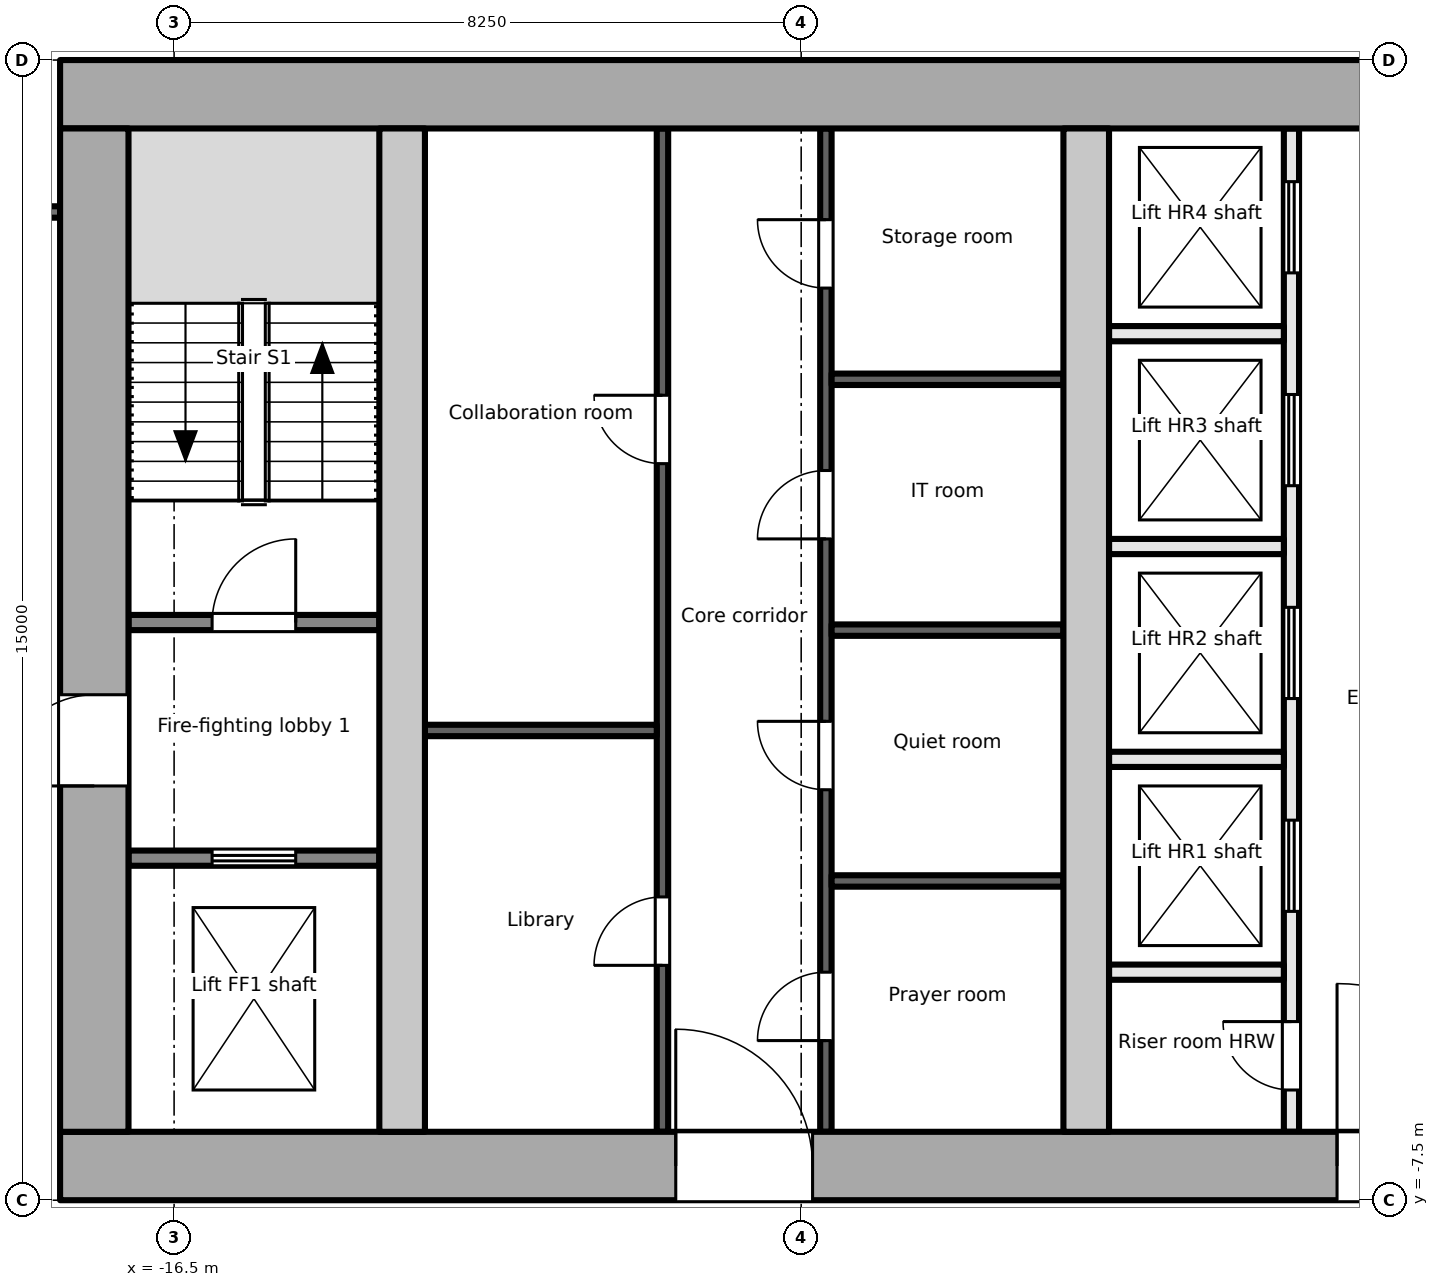
"""IFC4 building model, lengths in metres.
Left out: names, types, materials, properties, quantities, classifications, styles, units other than length and angle.
Written with IfcOpenShell. Run it as: python <this file> out.ifc"""

import sys

from ifc_helpers import new_model, si_unit, direction, frame, frame_2d, origin, place, context, subcontext, project, spatial, rectangle, extrude, element, fill, save


model = new_model("IFC4")
c1 = context("Model", 3, precision=1e-05, world=origin(), true_north=direction((0.0, 1.0)))
c2 = subcontext(c1, "Body", "Model", "MODEL_VIEW")
j1 = project(units=[si_unit("LENGTHUNIT", "METRE"), si_unit("PLANEANGLEUNIT", "RADIAN")], contexts=[c1])
p1 = place(None, origin())
s1 = spatial("IfcSite", under=j1, at=p1, CompositionType="ELEMENT")
p2 = place(p1, origin())
s2 = spatial("IfcBuilding", under=s1, at=p2, CompositionType="ELEMENT")
p3 = place(p2, frame((0.0, 0.0, 191.9)))
s3 = spatial("IfcBuildingStorey", under=s2, at=p3, CompositionType="ELEMENT", Elevation=191.9)
p4 = place(p3, frame((-18.0, -7.05, -0.2), z_axis=(0.0, 0.0, 1.0), x_axis=(1.0, 0.0, 0.0)))
e1 = element("IfcWall", 1, at=p4, inside=s3, PredefinedType="SHEAR", context=c2, shape_type="SweptSolid", body=[
    extrude(rectangle(XDim=36.0, YDim=0.9, at=frame_2d((18.0, 0.0))), origin(), (0.0, 0.0, 1.0), 3.9),
])
p5 = place(p4, frame((8.1, 0.0, 0.2)))
e2 = element("IfcOpeningElement", 2, at=p5, cuts=e1, PredefinedType="OPENING", context=c2, shape_type="SweptSolid", body=[
    extrude(rectangle(XDim=1.8, YDim=2.1, at=frame_2d((0.9, 1.05))), frame((0.0, 0.46, 0.0), z_axis=(0.0, -1.0, 0.0), x_axis=(1.0, 0.0, 0.0)), (0.0, 0.0, 1.0), 0.921),
])
p6 = place(p4, frame((16.8, 0.0, 0.2)))
e3 = element("IfcOpeningElement", 3, at=p6, cuts=e1, PredefinedType="OPENING", context=c2, shape_type="SweptSolid", body=[
    extrude(rectangle(XDim=2.4, YDim=2.1, at=frame_2d((1.2, 1.05))), frame((0.0, 0.46, 0.0), z_axis=(0.0, -1.0, 0.0), x_axis=(1.0, 0.0, 0.0)), (0.0, 0.0, 1.0), 0.921),
])
p7 = place(p4, frame((26.1, 0.0, 0.2)))
e4 = element("IfcOpeningElement", 4, at=p7, cuts=e1, PredefinedType="OPENING", context=c2, shape_type="SweptSolid", body=[
    extrude(rectangle(XDim=2.4, YDim=2.1, at=frame_2d((1.2, 1.05))), frame((0.0, 0.46, 0.0), z_axis=(0.0, -1.0, 0.0), x_axis=(1.0, 0.0, 0.0)), (0.0, 0.0, 1.0), 0.921),
])
p8 = place(p3, frame((-18.0, 7.05, -0.2), z_axis=(0.0, 0.0, 1.0), x_axis=(1.0, 0.0, 0.0)))
e5 = element("IfcWall", 5, at=p8, inside=s3, PredefinedType="SHEAR", context=c2, shape_type="SweptSolid", body=[
    extrude(rectangle(XDim=36.0, YDim=0.9, at=frame_2d((18.0, 0.0))), origin(), (0.0, 0.0, 1.0), 3.9),
])
p9 = place(p3, frame((-17.55, -6.6, -0.2), z_axis=(0.0, 0.0, 1.0), x_axis=(0.0, 1.0, 0.0)))
e6 = element("IfcWall", 6, at=p9, inside=s3, PredefinedType="SHEAR", context=c2, shape_type="SweptSolid", body=[
    extrude(rectangle(XDim=13.2, YDim=0.9, at=frame_2d((6.6, 0.0))), origin(), (0.0, 0.0, 1.0), 3.9),
])
p10 = place(p9, frame((4.55, 0.0, 0.2)))
e7 = element("IfcOpeningElement", 7, at=p10, cuts=e6, PredefinedType="OPENING", context=c2, shape_type="SweptSolid", body=[
    extrude(rectangle(XDim=1.2, YDim=2.1, at=frame_2d((0.6, 1.05))), frame((0.0, 0.46, 0.0), z_axis=(0.0, -1.0, 0.0), x_axis=(1.0, 0.0, 0.0)), (0.0, 0.0, 1.0), 0.921),
])
for number, where, z_axis, x_axis in (
    (8, (-13.5, -6.6, -0.2), (0.0, 0.0, 1.0), (0.0, 1.0, 0.0)),
    (9, (-4.5, -6.6, -0.2), (0.0, 0.0, 1.0), (0.0, 1.0, 0.0)),
):
    element("IfcWall", number, at=place(p3, frame(where, z_axis=z_axis, x_axis=x_axis)), inside=s3, PredefinedType="SHEAR", context=c2, shape_type="SweptSolid", body=[
        extrude(rectangle(XDim=13.2, YDim=0.6, at=frame_2d((6.6, 0.0))), origin(), (0.0, 0.0, 1.0), 3.9),
    ])
p11 = place(p3, frame((-17.1, -3.0, 0.0), z_axis=(0.0, 0.0, 1.0), x_axis=(1.0, 0.0, 0.0)))
e10 = element("IfcWall", 10, at=p11, inside=s3, PredefinedType="PARTITIONING", context=c2, shape_type="SweptSolid", body=[
    extrude(rectangle(XDim=3.3, YDim=0.2, at=frame_2d((1.65, 0.0))), origin(), (0.0, 0.0, 1.0), 3.7),
])
p12 = place(p11, frame((1.1, 0.0, 0.0)))
e11 = element("IfcOpeningElement", 11, at=p12, cuts=e10, PredefinedType="OPENING", context=c2, shape_type="SweptSolid", body=[
    extrude(rectangle(XDim=1.1, YDim=2.1, at=frame_2d((0.55, 1.05))), frame((0.0, 0.111, 0.0), z_axis=(0.0, -1.0, 0.0), x_axis=(1.0, 0.0, 0.0)), (0.0, 0.0, 1.0), 0.221),
])
p13 = place(p3, frame((-17.1, 0.1, 0.0), z_axis=(0.0, 0.0, 1.0), x_axis=(1.0, 0.0, 0.0)))
e12 = element("IfcWall", 12, at=p13, inside=s3, PredefinedType="PARTITIONING", context=c2, shape_type="SweptSolid", body=[
    extrude(rectangle(XDim=3.3, YDim=0.2, at=frame_2d((1.65, 0.0))), origin(), (0.0, 0.0, 1.0), 3.7),
])
p14 = place(p13, frame((1.1, 0.0, 0.0)))
e13 = element("IfcOpeningElement", 13, at=p14, cuts=e12, PredefinedType="OPENING", context=c2, shape_type="SweptSolid", body=[
    extrude(rectangle(XDim=1.1, YDim=2.1, at=frame_2d((0.55, 1.05))), frame((0.0, 0.111, 0.0), z_axis=(0.0, -1.0, 0.0), x_axis=(1.0, 0.0, 0.0)), (0.0, 0.0, 1.0), 0.221),
])
p15 = place(p3, frame((-10.075, -6.6, 0.0), z_axis=(0.0, 0.0, 1.0), x_axis=(0.0, 1.0, 0.0)))
e14 = element("IfcWall", 14, at=p15, inside=s3, PredefinedType="PARTITIONING", context=c2, shape_type="SweptSolid", body=[
    extrude(rectangle(XDim=13.2, YDim=0.15, at=frame_2d((6.6, 0.0))), origin(), (0.0, 0.0, 1.0), 3.7),
])
p16 = place(p15, frame((2.19, 0.0, 0.0)))
e15 = element("IfcOpeningElement", 15, at=p16, cuts=e14, PredefinedType="OPENING", context=c2, shape_type="SweptSolid", body=[
    extrude(rectangle(XDim=0.9, YDim=2.1, at=frame_2d((0.45, 1.05))), frame((0.0, 0.085, 0.0), z_axis=(0.0, -1.0, 0.0), x_axis=(1.0, 0.0, 0.0)), (0.0, 0.0, 1.0), 0.171),
])
p17 = place(p15, frame((8.79, 0.0, 0.0)))
e16 = element("IfcOpeningElement", 16, at=p17, cuts=e14, PredefinedType="OPENING", context=c2, shape_type="SweptSolid", body=[
    extrude(rectangle(XDim=0.9, YDim=2.1, at=frame_2d((0.45, 1.05))), frame((0.0, 0.085, 0.0), z_axis=(0.0, -1.0, 0.0), x_axis=(1.0, 0.0, 0.0)), (0.0, 0.0, 1.0), 0.171),
])
p18 = place(p3, frame((-13.2, -1.32, 0.0), z_axis=(0.0, 0.0, 1.0), x_axis=(1.0, 0.0, 0.0)))
e17 = element("IfcWall", 17, at=p18, inside=s3, PredefinedType="PARTITIONING", context=c2, shape_type="SweptSolid", body=[
    extrude(rectangle(XDim=3.05, YDim=0.15, at=frame_2d((1.525, 0.0))), origin(), (0.0, 0.0, 1.0), 3.7),
])
p19 = place(p3, frame((-7.925, -6.6, 0.0), z_axis=(0.0, 0.0, 1.0), x_axis=(0.0, 1.0, 0.0)))
e18 = element("IfcWall", 18, at=p19, inside=s3, PredefinedType="PARTITIONING", context=c2, shape_type="SweptSolid", body=[
    extrude(rectangle(XDim=13.2, YDim=0.15, at=frame_2d((6.6, 0.0))), origin(), (0.0, 0.0, 1.0), 3.7),
])
p20 = place(p19, frame((1.2, 0.0, 0.0)))
e19 = element("IfcOpeningElement", 19, at=p20, cuts=e18, PredefinedType="OPENING", context=c2, shape_type="SweptSolid", body=[
    extrude(rectangle(XDim=0.9, YDim=2.1, at=frame_2d((0.45, 1.05))), frame((0.0, 0.085, 0.0), z_axis=(0.0, -1.0, 0.0), x_axis=(1.0, 0.0, 0.0)), (0.0, 0.0, 1.0), 0.171),
])
p21 = place(p19, frame((4.5, 0.0, 0.0)))
e20 = element("IfcOpeningElement", 20, at=p21, cuts=e18, PredefinedType="OPENING", context=c2, shape_type="SweptSolid", body=[
    extrude(rectangle(XDim=0.9, YDim=2.1, at=frame_2d((0.45, 1.05))), frame((0.0, 0.085, 0.0), z_axis=(0.0, -1.0, 0.0), x_axis=(1.0, 0.0, 0.0)), (0.0, 0.0, 1.0), 0.171),
])
p22 = place(p19, frame((7.8, 0.0, 0.0)))
e21 = element("IfcOpeningElement", 21, at=p22, cuts=e18, PredefinedType="OPENING", context=c2, shape_type="SweptSolid", body=[
    extrude(rectangle(XDim=0.9, YDim=2.1, at=frame_2d((0.45, 1.05))), frame((0.0, 0.085, 0.0), z_axis=(0.0, -1.0, 0.0), x_axis=(1.0, 0.0, 0.0)), (0.0, 0.0, 1.0), 0.171),
])
p23 = place(p19, frame((11.1, 0.0, 0.0)))
e22 = element("IfcOpeningElement", 22, at=p23, cuts=e18, PredefinedType="OPENING", context=c2, shape_type="SweptSolid", body=[
    extrude(rectangle(XDim=0.9, YDim=2.1, at=frame_2d((0.45, 1.05))), frame((0.0, 0.085, 0.0), z_axis=(0.0, -1.0, 0.0), x_axis=(1.0, 0.0, 0.0)), (0.0, 0.0, 1.0), 0.171),
])
for number, where, z_axis, x_axis in (
    (23, (-7.85, -3.3, 0.0), (0.0, 0.0, 1.0), (1.0, 0.0, 0.0)),
    (24, (-7.85, 0.0, 0.0), (0.0, 0.0, 1.0), (1.0, 0.0, 0.0)),
    (25, (-7.85, 3.3, 0.0), (0.0, 0.0, 1.0), (1.0, 0.0, 0.0)),
):
    element("IfcWall", number, at=place(p3, frame(where, z_axis=z_axis, x_axis=x_axis)), inside=s3, PredefinedType="PARTITIONING", context=c2, shape_type="SweptSolid", body=[
        extrude(rectangle(XDim=3.05, YDim=0.15, at=frame_2d((1.525, 0.0))), origin(), (0.0, 0.0, 1.0), 3.7),
    ])
p24 = place(p3, frame((-1.8, -6.6, 0.0), z_axis=(0.0, 0.0, 1.0), x_axis=(0.0, 1.0, 0.0)))
e26 = element("IfcWall", 26, at=p24, inside=s3, PredefinedType="PARTITIONING", context=c2, shape_type="SweptSolid", body=[
    extrude(rectangle(XDim=13.2, YDim=0.2, at=frame_2d((6.6, 0.0))), origin(), (0.0, 0.0, 1.0), 3.7),
])
p25 = place(p24, frame((0.55, 0.0, 0.0)))
e27 = element("IfcOpeningElement", 27, at=p25, cuts=e26, PredefinedType="OPENING", context=c2, shape_type="SweptSolid", body=[
    extrude(rectangle(XDim=0.9, YDim=2.1, at=frame_2d((0.45, 1.05))), frame((0.0, 0.111, 0.0), z_axis=(0.0, -1.0, 0.0), x_axis=(1.0, 0.0, 0.0)), (0.0, 0.0, 1.0), 0.221),
])
p26 = place(p24, frame((2.9, 0.0, 0.0)))
e28 = element("IfcOpeningElement", 28, at=p26, cuts=e26, PredefinedType="OPENING", context=c2, shape_type="SweptSolid", body=[
    extrude(rectangle(XDim=1.2, YDim=2.1, at=frame_2d((0.6, 1.05))), frame((0.0, 0.111, 0.0), z_axis=(0.0, -1.0, 0.0), x_axis=(1.0, 0.0, 0.0)), (0.0, 0.0, 1.0), 0.221),
])
p27 = place(p24, frame((5.7, 0.0, 0.0)))
e29 = element("IfcOpeningElement", 29, at=p27, cuts=e26, PredefinedType="OPENING", context=c2, shape_type="SweptSolid", body=[
    extrude(rectangle(XDim=1.2, YDim=2.1, at=frame_2d((0.6, 1.05))), frame((0.0, 0.111, 0.0), z_axis=(0.0, -1.0, 0.0), x_axis=(1.0, 0.0, 0.0)), (0.0, 0.0, 1.0), 0.221),
])
p28 = place(p24, frame((8.5, 0.0, 0.0)))
e30 = element("IfcOpeningElement", 30, at=p28, cuts=e26, PredefinedType="OPENING", context=c2, shape_type="SweptSolid", body=[
    extrude(rectangle(XDim=1.2, YDim=2.1, at=frame_2d((0.6, 1.05))), frame((0.0, 0.111, 0.0), z_axis=(0.0, -1.0, 0.0), x_axis=(1.0, 0.0, 0.0)), (0.0, 0.0, 1.0), 0.221),
])
p29 = place(p24, frame((11.3, 0.0, 0.0)))
e31 = element("IfcOpeningElement", 31, at=p29, cuts=e26, PredefinedType="OPENING", context=c2, shape_type="SweptSolid", body=[
    extrude(rectangle(XDim=1.2, YDim=2.1, at=frame_2d((0.6, 1.05))), frame((0.0, 0.111, 0.0), z_axis=(0.0, -1.0, 0.0), x_axis=(1.0, 0.0, 0.0)), (0.0, 0.0, 1.0), 0.221),
])
for number, where, z_axis, x_axis in (
    (32, (-4.2, -1.7, 0.0), (0.0, 0.0, 1.0), (1.0, 0.0, 0.0)),
    (33, (-4.2, 1.1, 0.0), (0.0, 0.0, 1.0), (1.0, 0.0, 0.0)),
    (34, (-4.2, 3.9, 0.0), (0.0, 0.0, 1.0), (1.0, 0.0, 0.0)),
    (35, (-4.2, -4.5, 0.0), (0.0, 0.0, 1.0), (1.0, 0.0, 0.0)),
):
    element("IfcWall", number, at=place(p3, frame(where, z_axis=z_axis, x_axis=x_axis)), inside=s3, PredefinedType="PARTITIONING", context=c2, shape_type="SweptSolid", body=[
        extrude(rectangle(XDim=2.3, YDim=0.2, at=frame_2d((1.15, 0.0))), origin(), (0.0, 0.0, 1.0), 3.7),
    ])
p30 = place(p3, frame((-20.325, 5.501, 0.0), z_axis=(0.0, 0.0, 1.0), x_axis=(1.0, 0.0, 0.0)))
e36 = element("IfcWall", 36, at=p30, inside=s3, PredefinedType="PARTITIONING", context=c2, shape_type="SweptSolid", body=[
    extrude(rectangle(XDim=2.325, YDim=0.15, at=frame_2d((1.163, 0.0))), origin(), (0.0, 0.0, 1.0), 3.7),
])
p31 = place(p12, origin())
e37 = element("IfcDoor", 37, at=p31, inside=s3, OperationType="DOUBLE_DOOR_SLIDING", PredefinedType="DOOR", context=c2, shape_type="SweptSolid", body=[
    extrude(rectangle(XDim=1.1, YDim=2.1, at=frame_2d((0.55, 1.05))), frame((0.0, 0.025, 0.0), z_axis=(0.0, -1.0, 0.0), x_axis=(1.0, 0.0, 0.0)), (0.0, 0.0, 1.0), 0.05),
])
fill(e11, e37)
p32 = place(p10, origin())
e38 = element("IfcDoor", 38, at=p32, inside=s3, OperationType="SINGLE_SWING_LEFT", PredefinedType="DOOR", context=c2, shape_type="SweptSolid", body=[
    extrude(rectangle(XDim=1.2, YDim=2.1, at=frame_2d((0.6, 1.05))), frame((0.0, 0.025, 0.0), z_axis=(0.0, -1.0, 0.0), x_axis=(1.0, 0.0, 0.0)), (0.0, 0.0, 1.0), 0.05),
])
fill(e7, e38)
p33 = place(p14, origin())
e39 = element("IfcDoor", 39, at=p33, inside=s3, OperationType="SINGLE_SWING_RIGHT", PredefinedType="DOOR", context=c2, shape_type="SweptSolid", body=[
    extrude(rectangle(XDim=1.1, YDim=2.1, at=frame_2d((0.55, 1.05))), frame((0.0, 0.025, 0.0), z_axis=(0.0, -1.0, 0.0), x_axis=(1.0, 0.0, 0.0)), (0.0, 0.0, 1.0), 0.05),
])
fill(e13, e39)
p34 = place(p16, origin())
e40 = element("IfcDoor", 40, at=p34, inside=s3, OperationType="SINGLE_SWING_LEFT", PredefinedType="DOOR", context=c2, shape_type="SweptSolid", body=[
    extrude(rectangle(XDim=0.9, YDim=2.1, at=frame_2d((0.45, 1.05))), frame((0.0, 0.025, 0.0), z_axis=(0.0, -1.0, 0.0), x_axis=(1.0, 0.0, 0.0)), (0.0, 0.0, 1.0), 0.05),
])
fill(e15, e40)
p35 = place(p17, origin())
e41 = element("IfcDoor", 41, at=p35, inside=s3, OperationType="SINGLE_SWING_RIGHT", PredefinedType="DOOR", context=c2, shape_type="SweptSolid", body=[
    extrude(rectangle(XDim=0.9, YDim=2.1, at=frame_2d((0.45, 1.05))), frame((0.0, 0.025, 0.0), z_axis=(0.0, -1.0, 0.0), x_axis=(1.0, 0.0, 0.0)), (0.0, 0.0, 1.0), 0.05),
])
fill(e16, e41)
p36 = place(p20, origin())
e42 = element("IfcDoor", 42, at=p36, inside=s3, OperationType="SINGLE_SWING_LEFT", PredefinedType="DOOR", context=c2, shape_type="SweptSolid", body=[
    extrude(rectangle(XDim=0.9, YDim=2.1, at=frame_2d((0.45, 1.05))), frame((0.0, 0.025, 0.0), z_axis=(0.0, -1.0, 0.0), x_axis=(1.0, 0.0, 0.0)), (0.0, 0.0, 1.0), 0.05),
])
fill(e19, e42)
p37 = place(p21, origin())
e43 = element("IfcDoor", 43, at=p37, inside=s3, OperationType="SINGLE_SWING_RIGHT", PredefinedType="DOOR", context=c2, shape_type="SweptSolid", body=[
    extrude(rectangle(XDim=0.9, YDim=2.1, at=frame_2d((0.45, 1.05))), frame((0.0, 0.025, 0.0), z_axis=(0.0, -1.0, 0.0), x_axis=(1.0, 0.0, 0.0)), (0.0, 0.0, 1.0), 0.05),
])
fill(e20, e43)
p38 = place(p22, origin())
e44 = element("IfcDoor", 44, at=p38, inside=s3, OperationType="SINGLE_SWING_LEFT", PredefinedType="DOOR", context=c2, shape_type="SweptSolid", body=[
    extrude(rectangle(XDim=0.9, YDim=2.1, at=frame_2d((0.45, 1.05))), frame((0.0, 0.025, 0.0), z_axis=(0.0, -1.0, 0.0), x_axis=(1.0, 0.0, 0.0)), (0.0, 0.0, 1.0), 0.05),
])
fill(e21, e44)
p39 = place(p23, origin())
e45 = element("IfcDoor", 45, at=p39, inside=s3, OperationType="SINGLE_SWING_RIGHT", PredefinedType="DOOR", context=c2, shape_type="SweptSolid", body=[
    extrude(rectangle(XDim=0.9, YDim=2.1, at=frame_2d((0.45, 1.05))), frame((0.0, 0.025, 0.0), z_axis=(0.0, -1.0, 0.0), x_axis=(1.0, 0.0, 0.0)), (0.0, 0.0, 1.0), 0.05),
])
fill(e22, e45)
p40 = place(p5, origin())
e46 = element("IfcDoor", 46, at=p40, inside=s3, OperationType="SINGLE_SWING_LEFT", PredefinedType="DOOR", context=c2, shape_type="SweptSolid", body=[
    extrude(rectangle(XDim=1.8, YDim=2.1, at=frame_2d((0.9, 1.05))), frame((0.0, 0.025, 0.0), z_axis=(0.0, -1.0, 0.0), x_axis=(1.0, 0.0, 0.0)), (0.0, 0.0, 1.0), 0.05),
])
fill(e2, e46)
p41 = place(p25, origin())
e47 = element("IfcDoor", 47, at=p41, inside=s3, OperationType="SINGLE_SWING_RIGHT", PredefinedType="DOOR", context=c2, shape_type="SweptSolid", body=[
    extrude(rectangle(XDim=0.9, YDim=2.1, at=frame_2d((0.45, 1.05))), frame((0.0, 0.025, 0.0), z_axis=(0.0, -1.0, 0.0), x_axis=(1.0, 0.0, 0.0)), (0.0, 0.0, 1.0), 0.05),
])
fill(e27, e47)
p42 = place(p26, origin())
e48 = element("IfcDoor", 48, at=p42, inside=s3, OperationType="DOUBLE_DOOR_SLIDING", PredefinedType="DOOR", context=c2, shape_type="SweptSolid", body=[
    extrude(rectangle(XDim=1.2, YDim=2.1, at=frame_2d((0.6, 1.05))), frame((0.0, 0.025, 0.0), z_axis=(0.0, -1.0, 0.0), x_axis=(1.0, 0.0, 0.0)), (0.0, 0.0, 1.0), 0.05),
])
fill(e28, e48)
p43 = place(p27, origin())
e49 = element("IfcDoor", 49, at=p43, inside=s3, OperationType="DOUBLE_DOOR_SLIDING", PredefinedType="DOOR", context=c2, shape_type="SweptSolid", body=[
    extrude(rectangle(XDim=1.2, YDim=2.1, at=frame_2d((0.6, 1.05))), frame((0.0, 0.025, 0.0), z_axis=(0.0, -1.0, 0.0), x_axis=(1.0, 0.0, 0.0)), (0.0, 0.0, 1.0), 0.05),
])
fill(e29, e49)
p44 = place(p28, origin())
e50 = element("IfcDoor", 50, at=p44, inside=s3, OperationType="DOUBLE_DOOR_SLIDING", PredefinedType="DOOR", context=c2, shape_type="SweptSolid", body=[
    extrude(rectangle(XDim=1.2, YDim=2.1, at=frame_2d((0.6, 1.05))), frame((0.0, 0.025, 0.0), z_axis=(0.0, -1.0, 0.0), x_axis=(1.0, 0.0, 0.0)), (0.0, 0.0, 1.0), 0.05),
])
fill(e30, e50)
p45 = place(p29, origin())
e51 = element("IfcDoor", 51, at=p45, inside=s3, OperationType="DOUBLE_DOOR_SLIDING", PredefinedType="DOOR", context=c2, shape_type="SweptSolid", body=[
    extrude(rectangle(XDim=1.2, YDim=2.1, at=frame_2d((0.6, 1.05))), frame((0.0, 0.025, 0.0), z_axis=(0.0, -1.0, 0.0), x_axis=(1.0, 0.0, 0.0)), (0.0, 0.0, 1.0), 0.05),
])
fill(e31, e51)
p46 = place(p6, origin())
e52 = element("IfcDoor", 52, at=p46, inside=s3, OperationType="DOUBLE_DOOR_DOUBLE_SWING", PredefinedType="DOOR", context=c2, shape_type="SweptSolid", body=[
    extrude(rectangle(XDim=2.4, YDim=2.1, at=frame_2d((1.2, 1.05))), frame((0.0, 0.025, 0.0), z_axis=(0.0, -1.0, 0.0), x_axis=(1.0, 0.0, 0.0)), (0.0, 0.0, 1.0), 0.05),
])
fill(e3, e52)
save(model, sys.argv[1])
